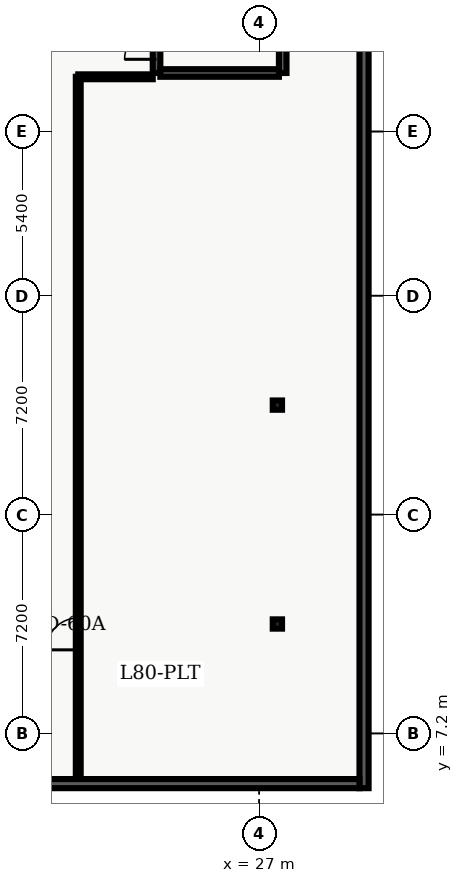
"""IFC4 building model, lengths in metres.
Left out: names, types, materials, properties, quantities, classifications, styles, units other than length and angle.
Written with IfcOpenShell. Run it as: python <this file> out.ifc"""

import sys

from ifc_helpers import new_model, entity, si_unit, converted_unit, direction, frame, origin_with_axes, origin_2d_with_axis, place, context, subcontext, project, spatial, polyline, rectangle, hollow_rectangle, outline, extrude, element, fill, save


model = new_model("IFC4")
c1 = context("Model", 3, precision=1e-05, world=origin_with_axes(), true_north=direction((0.0, 1.0)))
c2 = subcontext(c1, "Body", "Model", "MODEL_VIEW")
j1 = project(units=[si_unit("LENGTHUNIT", "METRE"), converted_unit("PLANEANGLEUNIT", "DEGREE", entity("IfcPlaneAngleMeasure", 0.017), si_unit("PLANEANGLEUNIT", "RADIAN"), dimensions=[0, 0, 0, 0, 0, 0, 0])], contexts=[c1])
p1 = place(None, origin_with_axes())
s1 = spatial("IfcSite", under=j1, at=p1, CompositionType="ELEMENT")
p2 = place(p1, origin_with_axes())
s2 = spatial("IfcBuilding", under=s1, at=p2, CompositionType="ELEMENT")
p3 = place(p2, frame((0.0, 0.0, 324.3), z_axis=(0.0, 0.0, 1.0), x_axis=(1.0, 0.0, 0.0)))
s3 = spatial("IfcBuildingStorey", under=s2, at=p3, CompositionType="ELEMENT", Elevation=324.3)
p4 = place(p3, frame((23.625, 28.925, 0.0), z_axis=(0.0, 0.0, 1.0), x_axis=(0.0, 1.0, 0.0)))
e1 = element("IfcWall", 1, at=p4, inside=s3, PredefinedType="SHEAR", context=c2, shape_type="SweptSolid", body=[
    extrude(outline(polyline([(0.0, -0.125), (8.65, -0.125), (8.65, 0.125), (0.0, 0.125), (0.0, -0.125)])), origin_with_axes(), (0.0, 0.0, 1.0), 3.64),
])
p5 = place(p4, frame((0.975, 0.0, 0.0), z_axis=(0.0, 0.0, 1.0), x_axis=(1.0, 0.0, 0.0)))
e2 = element("IfcOpeningElement", 2, at=p5, cuts=e1, PredefinedType="OPENING", context=c2, shape_type="SweptSolid", body=[
    extrude(rectangle(XDim=1.05, YDim=0.27, at=origin_2d_with_axis()), origin_with_axes(), (0.0, 0.0, 1.0), 2.15),
])
p6 = place(p3, frame((27.775, 28.925, 0.0), z_axis=(0.0, 0.0, 1.0), x_axis=(0.0, 1.0, 0.0)))
e3 = element("IfcWall", 3, at=p6, inside=s3, PredefinedType="SHEAR", context=c2, shape_type="SweptSolid", body=[
    extrude(outline(polyline([(0.0, -0.125), (8.65, -0.125), (8.65, 0.125), (0.0, 0.125), (0.0, -0.125)])), origin_with_axes(), (0.0, 0.0, 1.0), 3.64),
])
p7 = place(p3, frame((23.75, 28.925, 0.0), z_axis=(0.0, 0.0, 1.0), x_axis=(1.0, 0.0, 0.0)))
e4 = element("IfcWall", 4, at=p7, inside=s3, PredefinedType="SHEAR", context=c2, shape_type="SweptSolid", body=[
    extrude(outline(polyline([(0.0, -0.125), (3.9, -0.125), (3.9, 0.125), (0.0, 0.125), (0.0, -0.125)])), origin_with_axes(), (0.0, 0.0, 1.0), 3.64),
])
for number, where, z_axis, x_axis in (
    (5, (27.6, 10.8, 0.0), (0.0, 0.0, 1.0), (1.0, 0.0, 0.0)),
    (6, (27.6, 18.0, 0.0), (0.0, 0.0, 1.0), (1.0, 0.0, 0.0)),
):
    element("IfcColumn", number, at=place(p3, frame(where, z_axis=z_axis, x_axis=x_axis)), inside=s3, PredefinedType="COLUMN", context=c2, shape_type="SweptSolid", body=[
        extrude(hollow_rectangle(XDim=0.305, YDim=0.305, WallThickness=0.015, InnerFilletRadius=0.015, OuterFilletRadius=0.03, at=origin_2d_with_axis()), origin_with_axes(), (0.0, 0.0, 1.0), 3.9),
    ])
p8 = place(p3, frame((21.05, 5.695, 0.0), z_axis=(0.0, 0.0, 1.0), x_axis=(0.0, 1.0, 0.0)))
e7 = element("IfcWall", 7, at=p8, inside=s3, PredefinedType="PARTITIONING", context=c2, shape_type="SweptSolid", body=[
    extrude(outline(polyline([(0.0, -0.08), (23.105, -0.08), (23.105, 0.08), (0.0, 0.08), (0.0, -0.08)])), origin_with_axes(), (0.0, 0.0, 1.0), 2.68),
])
p9 = place(p8, frame((4.78, 0.0, 0.0), z_axis=(0.0, 0.0, 1.0), x_axis=(1.0, 0.0, 0.0)))
e8 = element("IfcOpeningElement", 8, at=p9, cuts=e7, PredefinedType="OPENING", context=c2, shape_type="SweptSolid", body=[
    extrude(rectangle(XDim=1.05, YDim=0.18, at=origin_2d_with_axis()), origin_with_axes(), (0.0, 0.0, 1.0), 2.15),
])
p10 = place(p3, frame((21.05, 28.8, 0.0), z_axis=(0.0, 0.0, 1.0), x_axis=(1.0, 0.0, 0.0)))
e9 = element("IfcWall", 9, at=p10, inside=s3, PredefinedType="PARTITIONING", context=c2, shape_type="SweptSolid", body=[
    extrude(outline(polyline([(0.0, -0.08), (2.45, -0.08), (2.45, 0.08), (0.0, 0.08), (0.0, -0.08)])), origin_with_axes(), (0.0, 0.0, 1.0), 2.68),
])
p11 = place(p3, frame((30.45, 31.0, 0.0), z_axis=(0.0, 0.0, 1.0), x_axis=(0.0, -1.0, 0.0)))
e10 = element("IfcWall", 10, at=p11, inside=s3, PredefinedType="SOLIDWALL", context=c2, shape_type="SweptSolid", body=[
    extrude(outline(polyline([(0.0, -0.15), (25.6, -0.15), (25.6, 0.15), (0.0, 0.15), (0.0, -0.15)])), origin_with_axes(), (0.0, 0.0, 1.0), 3.64),
])
p12 = place(p3, frame((30.3, 5.55, 0.0), z_axis=(0.0, 0.0, 1.0), x_axis=(-1.0, 0.0, 0.0)))
e11 = element("IfcWall", 11, at=p12, inside=s3, PredefinedType="SOLIDWALL", context=c2, shape_type="SweptSolid", body=[
    extrude(outline(polyline([(0.0, -0.15), (20.1, -0.15), (20.1, 0.15), (0.0, 0.15), (0.0, -0.15)])), origin_with_axes(), (0.0, 0.0, 1.0), 3.64),
])
p13 = place(p4, frame((0.975, 0.0, 0.0), z_axis=(0.0, 0.0, 1.0), x_axis=(1.0, 0.0, 0.0)))
e12 = element("IfcDoor", 12, at=p13, inside=s3, OperationType="SINGLE_SWING_LEFT", PredefinedType="DOOR", context=c2, shape_type="SweptSolid", body=[
    extrude(rectangle(XDim=1.05, YDim=0.09, at=origin_2d_with_axis()), origin_with_axes(), (0.0, 0.0, 1.0), 2.15),
])
fill(e2, e12)
p14 = place(p8, frame((4.78, 0.0, 0.0), z_axis=(0.0, 0.0, 1.0), x_axis=(1.0, 0.0, 0.0)))
e13 = element("IfcDoor", 13, at=p14, inside=s3, OperationType="SINGLE_SWING_LEFT", PredefinedType="DOOR", context=c2, shape_type="SweptSolid", body=[
    extrude(rectangle(XDim=1.05, YDim=0.09, at=origin_2d_with_axis()), origin_with_axes(), (0.0, 0.0, 1.0), 2.15),
])
fill(e8, e13)
save(model, sys.argv[1])
